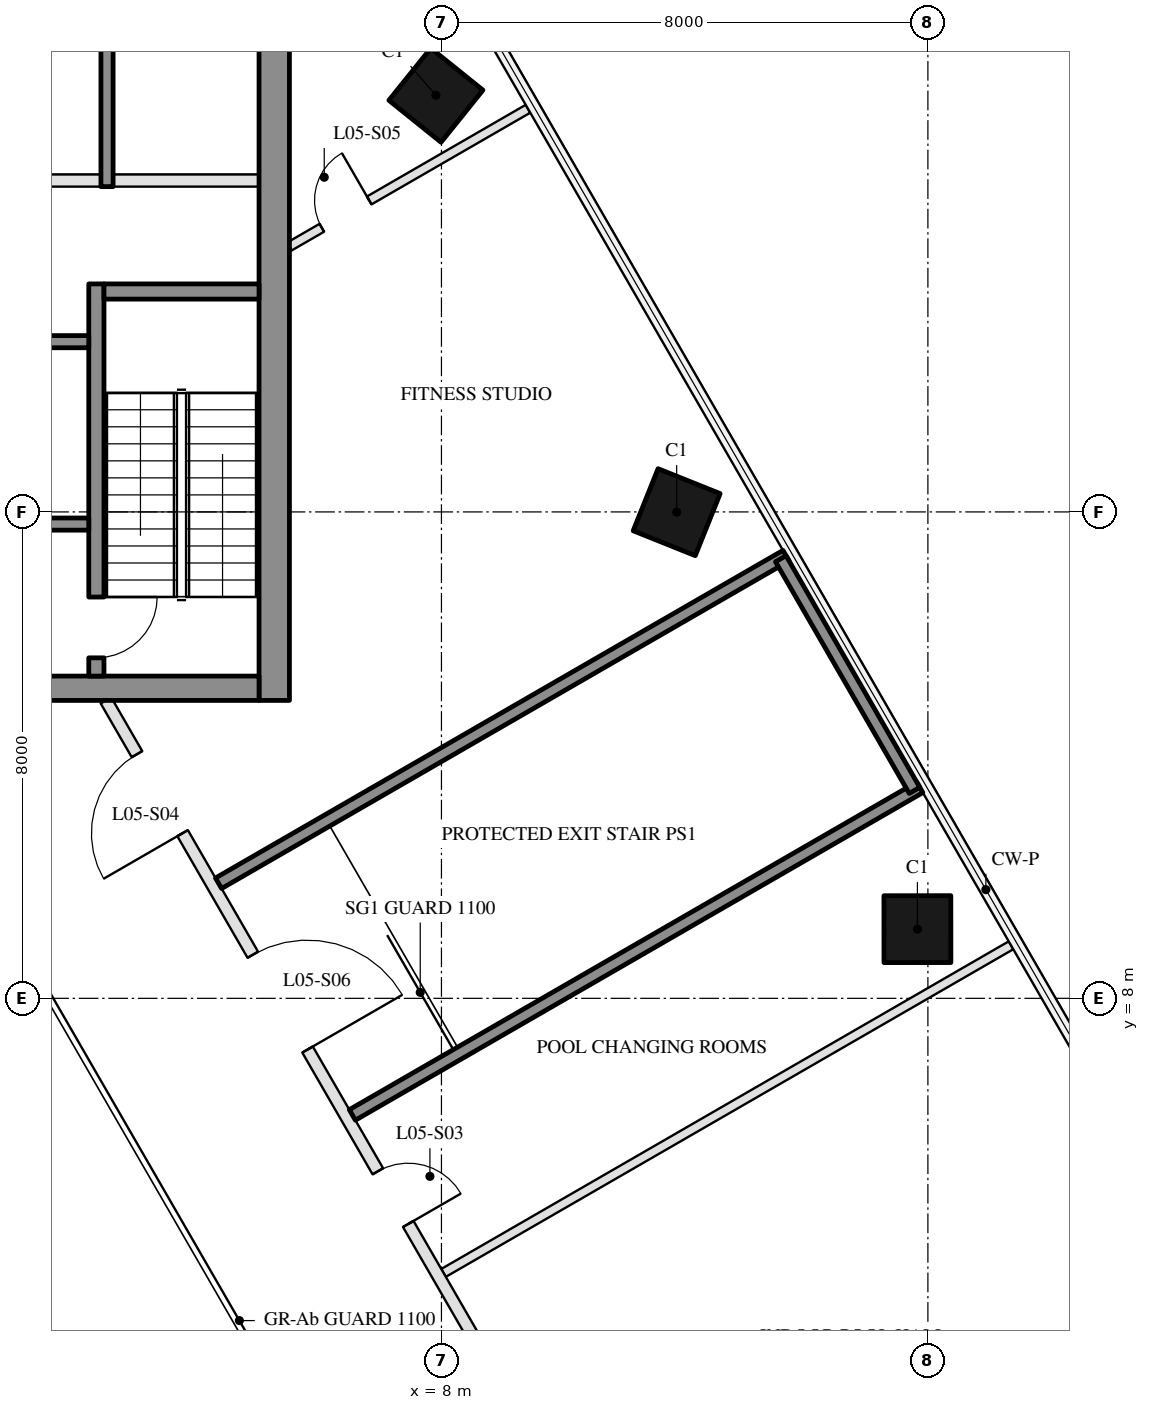
"""IFC4 building model, lengths in metres.
Left out: names, types, materials, properties, quantities, classifications, styles, units other than length and angle.
Written with IfcOpenShell. Run it as: python <this file> out.ifc"""

import sys

from ifc_helpers import new_model, si_unit, direction, frame, frame_2d, origin, origin_2d, place, context, subcontext, project, spatial, rectangle, hollow_rectangle, extrude, boolean, halfspace, element, fill, save


model = new_model("IFC4")
c1 = context("Model", 3, precision=1e-05, world=origin(), true_north=direction((0.0, 1.0)))
c2 = subcontext(c1, "Body", "Model", "MODEL_VIEW")
j1 = project(units=[si_unit("LENGTHUNIT", "METRE"), si_unit("PLANEANGLEUNIT", "RADIAN")], contexts=[c1])
p1 = place(None, origin())
s1 = spatial("IfcSite", under=j1, at=p1, CompositionType="ELEMENT")
p2 = place(p1, origin())
s2 = spatial("IfcBuilding", under=s1, at=p2, CompositionType="ELEMENT")
p3 = place(p2, frame((0.0, 0.0, 33.0)))
s3 = spatial("IfcBuildingStorey", under=s2, at=p3, CompositionType="ELEMENT", Elevation=33.0)
p4 = place(p3, frame((15.827, 9.138, 0.0), z_axis=(-0.008842855216, -0.005099560677, 0.999947897839), x_axis=(0.500158591732, -0.865933821414, 6.948309e-06)))
e1 = element("IfcColumn", 1, at=p4, inside=s3, PredefinedType="COLUMN", context=c2, shape_type="SweptSolid", body=[
    boolean("DIFFERENCE", boolean("DIFFERENCE", extrude(hollow_rectangle(XDim=1.1, YDim=1.1, WallThickness=0.05, at=origin_2d()), origin(), (0.0, 0.0, 1.0), 4.5), halfspace(frame((0.0, 0.0, 0.01), z_axis=(0.0, 0.0, 1.0), x_axis=(1.0, 0.0, 0.0)), True)), halfspace(frame((0.0, 0.0, 4.494), z_axis=(0.0, 0.0, 1.0), x_axis=(1.0, 0.0, 0.0)), False)),
])
p5 = place(p3, frame((11.868, 15.996, 0.0), z_axis=(-0.006835520265, -0.008680025734, 0.999938964545), x_axis=(-0.498767584387, 0.866726006756, 0.004114119219)))
e2 = element("IfcColumn", 2, at=p5, inside=s3, PredefinedType="COLUMN", context=c2, shape_type="SweptSolid", body=[
    boolean("DIFFERENCE", boolean("DIFFERENCE", extrude(hollow_rectangle(XDim=1.1, YDim=1.1, WallThickness=0.05, at=origin_2d()), origin(), (0.0, 0.0, 1.0), 4.5), halfspace(frame((0.0, 0.0, 0.01), z_axis=(0.0, 0.0, 1.0), x_axis=(1.0, 0.0, 0.0)), True)), halfspace(frame((0.0, 0.0, 4.494), z_axis=(0.0, 0.0, 1.0), x_axis=(1.0, 0.0, 0.0)), False)),
])
p6 = place(p3, frame((7.909, 22.854, 0.0), z_axis=(-0.004719641607, -0.012314467182, 0.999913035659), x_axis=(-0.503343741395, 0.864046735596, 0.008265391899)))
e3 = element("IfcColumn", 3, at=p6, inside=s3, PredefinedType="COLUMN", context=c2, shape_type="SweptSolid", body=[
    boolean("DIFFERENCE", boolean("DIFFERENCE", extrude(hollow_rectangle(XDim=1.1, YDim=1.1, WallThickness=0.05, at=origin_2d()), origin(), (0.0, 0.0, 1.0), 4.5), halfspace(frame((0.0, 0.0, 0.012), z_axis=(0.0, 0.0, 1.0), x_axis=(1.0, 0.0, 0.0)), True)), halfspace(frame((0.0, 0.0, 4.493), z_axis=(0.0, 0.0, 1.0), x_axis=(1.0, 0.0, 0.0)), False)),
])
p7 = place(p3, frame((5.25, 12.9, 0.0), z_axis=(0.0, 0.0, 1.0), x_axis=(0.0, 1.0, 0.0)))
e4 = element("IfcWall", 4, at=p7, inside=s3, PredefinedType="SHEAR", context=c2, shape_type="SweptSolid", body=[
    extrude(rectangle(XDim=14.91, YDim=0.5, at=frame_2d((7.455, 0.0))), origin(), (0.0, 0.0, 1.0), 4.2),
])
p8 = place(p3, frame((5.0, 13.1, 0.0), z_axis=(0.0, 0.0, 1.0), x_axis=(-1.0, 0.0, 0.0)))
e5 = element("IfcWall", 5, at=p8, inside=s3, PredefinedType="SHEAR", context=c2, shape_type="SweptSolid", body=[
    extrude(rectangle(XDim=10.0, YDim=0.4, at=frame_2d((5.0, 0.0))), origin(), (0.0, 0.0, 1.0), 4.2),
])
p9 = place(p8, frame((3.55, 0.0, 0.0)))
e6 = element("IfcOpeningElement", 6, at=p9, cuts=e5, PredefinedType="OPENING", context=c2, shape_type="SweptSolid", body=[
    extrude(rectangle(XDim=1.1, YDim=2.1, at=frame_2d((0.55, 1.05))), frame((0.0, 0.21, 0.0), z_axis=(0.0, -1.0, 0.0), x_axis=(1.0, 0.0, 0.0)), (0.0, 0.0, 1.0), 0.42),
])
p10 = place(p8, frame((5.85, 0.0, 0.0)))
e7 = element("IfcOpeningElement", 7, at=p10, cuts=e5, PredefinedType="OPENING", context=c2, shape_type="SweptSolid", body=[
    extrude(rectangle(XDim=1.4, YDim=2.1, at=frame_2d((0.7, 1.05))), frame((0.0, 0.21, 0.0), z_axis=(0.0, -1.0, 0.0), x_axis=(1.0, 0.0, 0.0)), (0.0, 0.0, 1.0), 0.42),
])
p11 = place(p3, frame((2.325, 13.3, 0.0), z_axis=(0.0, 0.0, 1.0), x_axis=(0.0, 1.0, 0.0)))
e8 = element("IfcWall", 8, at=p11, inside=s3, PredefinedType="SHEAR", context=c2, shape_type="SweptSolid", body=[
    extrude(rectangle(XDim=6.45, YDim=0.25, at=frame_2d((3.225, 0.0))), origin(), (0.0, 0.0, 1.0), 4.2),
])
p12 = place(p11, frame((0.3, 0.0, 0.0)))
e9 = element("IfcOpeningElement", 9, at=p12, cuts=e8, PredefinedType="OPENING", context=c2, shape_type="SweptSolid", body=[
    extrude(rectangle(XDim=1.0, YDim=2.1, at=frame_2d((0.5, 1.05))), frame((0.0, 0.135, 0.0), z_axis=(0.0, -1.0, 0.0), x_axis=(1.0, 0.0, 0.0)), (0.0, 0.0, 1.0), 0.27),
])
p13 = place(p3, frame((5.0, 19.625, 0.0), z_axis=(0.0, 0.0, 1.0), x_axis=(-1.0, 0.0, 0.0)))
e10 = element("IfcWall", 10, at=p13, inside=s3, PredefinedType="SHEAR", context=c2, shape_type="SweptSolid", body=[
    extrude(rectangle(XDim=2.55, YDim=0.25, at=frame_2d((1.275, 0.0))), origin(), (0.0, 0.0, 1.0), 4.2),
])
p14 = place(p3, frame((2.2, 18.8, 0.0), z_axis=(0.0, 0.0, 1.0), x_axis=(-1.0, 0.0, 0.0)))
e11 = element("IfcWall", 11, at=p14, inside=s3, PredefinedType="SHEAR", context=c2, shape_type="SweptSolid", body=[
    extrude(rectangle(XDim=2.8, YDim=0.2, at=frame_2d((1.4, 0.0))), origin(), (0.0, 0.0, 1.0), 4.2),
])
p15 = place(p3, frame((2.2, 15.8, 0.0), z_axis=(0.0, 0.0, 1.0), x_axis=(-1.0, 0.0, 0.0)))
e12 = element("IfcWall", 12, at=p15, inside=s3, PredefinedType="SHEAR", context=c2, shape_type="SweptSolid", body=[
    extrude(rectangle(XDim=2.8, YDim=0.2, at=frame_2d((1.4, 0.0))), origin(), (0.0, 0.0, 1.0), 4.2),
])
p16 = place(p15, frame((0.7, 0.0, 0.0)))
e13 = element("IfcOpeningElement", 13, at=p16, cuts=e12, PredefinedType="OPENING", context=c2, shape_type="SweptSolid", body=[
    extrude(rectangle(XDim=1.2, YDim=2.1, at=frame_2d((0.6, 1.05))), frame((0.0, 0.11, 0.0), z_axis=(0.0, -1.0, 0.0), x_axis=(1.0, 0.0, 0.0)), (0.0, 0.0, 1.0), 0.22),
])
p17 = place(p3, frame((2.5, 21.35, 0.0), z_axis=(0.0, 0.0, 1.0), x_axis=(0.0, 1.0, 0.0)))
e14 = element("IfcWall", 14, at=p17, inside=s3, PredefinedType="SHEAR", context=c2, shape_type="SweptSolid", body=[
    extrude(rectangle(XDim=2.8, YDim=0.2, at=frame_2d((1.4, 0.0))), origin(), (0.0, 0.0, 1.0), 4.2),
])
p18 = place(p3, frame((5.0, 21.45, 0.0), z_axis=(0.0, 0.0, 1.0), x_axis=(-1.0, 0.0, 0.0)))
e15 = element("IfcWall", 15, at=p18, inside=s3, PredefinedType="PARTITIONING", context=c2, shape_type="SweptSolid", body=[
    extrude(rectangle(XDim=2.4, YDim=0.2, at=frame_2d((1.2, 0.0))), origin(), (0.0, 0.0, 1.0), 4.2),
])
p19 = place(p3, frame((2.4, 21.45, 0.0), z_axis=(0.0, 0.0, 1.0), x_axis=(-1.0, 0.0, 0.0)))
e16 = element("IfcWall", 16, at=p19, inside=s3, PredefinedType="PARTITIONING", context=c2, shape_type="SweptSolid", body=[
    extrude(rectangle(XDim=2.8, YDim=0.2, at=frame_2d((1.4, 0.0))), origin(), (0.0, 0.0, 1.0), 4.2),
])
p20 = place(p3, frame((17.367, 8.872, 0.0), z_axis=(0.0, 0.0, 1.0), x_axis=(-0.866017693218, -0.500013354855, 0.0)))
e17 = element("IfcWall", 17, at=p20, inside=s3, PredefinedType="PARTITIONING", context=c2, shape_type="SweptSolid", body=[
    extrude(rectangle(XDim=10.776, YDim=0.15, at=frame_2d((5.388, 0.0))), origin(), (0.0, 0.0, 1.0), 4.2),
])
p21 = place(p3, frame((15.867, 11.47, 0.0), z_axis=(0.0, 0.0, 1.0), x_axis=(-0.866017693218, -0.500013354855, 0.0)))
e18 = element("IfcWall", 18, at=p21, inside=s3, PredefinedType="SOLIDWALL", context=c2, shape_type="SweptSolid", body=[
    extrude(rectangle(XDim=10.776, YDim=0.2, at=frame_2d((5.388, 0.0))), origin(), (0.0, 0.0, 1.0), 4.2),
])
p22 = place(p3, frame((13.667, 15.281, 0.0), z_axis=(0.0, 0.0, 1.0), x_axis=(-0.866027503583, -0.499996363024, 0.0)))
e19 = element("IfcWall", 19, at=p22, inside=s3, PredefinedType="SOLIDWALL", context=c2, shape_type="SweptSolid", body=[
    extrude(rectangle(XDim=10.776, YDim=0.2, at=frame_2d((5.388, 0.0))), origin(), (0.0, 0.0, 1.0), 4.2),
])
p23 = place(p3, frame((9.423, 22.631, 0.0), z_axis=(0.0, 0.0, 1.0), x_axis=(-0.866012369481, -0.500022575396, 0.0)))
e20 = element("IfcWall", 20, at=p23, inside=s3, PredefinedType="PARTITIONING", context=c2, shape_type="SweptSolid", body=[
    extrude(rectangle(XDim=4.53, YDim=0.15, at=frame_2d((2.265, 0.0))), origin(), (0.0, 0.0, 1.0), 4.2),
])
p24 = place(p23, frame((3.015, 0.0, 0.0)))
e21 = element("IfcOpeningElement", 21, at=p24, cuts=e20, PredefinedType="OPENING", context=c2, shape_type="SweptSolid", body=[
    extrude(rectangle(XDim=0.9, YDim=2.1, at=frame_2d((0.45, 1.05))), frame((0.0, 0.085, 0.0), z_axis=(0.0, -1.0, 0.0), x_axis=(1.0, 0.0, 0.0)), (0.0, 0.0, 1.0), 0.17),
])
p25 = place(p3, frame((12.413, -4.3, 0.0), z_axis=(0.0, 0.0, 1.0), x_axis=(-0.50000478328, 0.866022642139, 0.0)))
e22 = element("IfcWall", 22, at=p25, inside=s3, PredefinedType="PARTITIONING", context=c2, shape_type="SweptSolid", body=[
    extrude(rectangle(XDim=19.861, YDim=0.2, at=frame_2d((9.931, 0.0))), origin(), (0.0, 0.0, 1.0), 3.41),
])
p26 = place(p25, frame((1.642, 0.0, 0.0)))
e23 = element("IfcOpeningElement", 23, at=p26, cuts=e22, PredefinedType="OPENING", context=c2, shape_type="SweptSolid", body=[
    extrude(rectangle(XDim=1.2, YDim=2.1, at=frame_2d((0.6, 1.05))), frame((0.0, 0.11, 0.0), z_axis=(0.0, -1.0, 0.0), x_axis=(1.0, 0.0, 0.0)), (0.0, 0.0, 1.0), 0.22),
])
p27 = place(p25, frame((6.125, 0.0, 0.0)))
e24 = element("IfcOpeningElement", 24, at=p27, cuts=e22, PredefinedType="OPENING", context=c2, shape_type="SweptSolid", body=[
    extrude(rectangle(XDim=1.2, YDim=2.1, at=frame_2d((0.6, 1.05))), frame((0.0, 0.11, 0.0), z_axis=(0.0, -1.0, 0.0), x_axis=(1.0, 0.0, 0.0)), (0.0, 0.0, 1.0), 0.22),
])
p28 = place(p25, frame((9.918, 0.0, 0.0)))
e25 = element("IfcOpeningElement", 25, at=p28, cuts=e22, PredefinedType="OPENING", context=c2, shape_type="SweptSolid", body=[
    extrude(rectangle(XDim=1.0, YDim=2.1, at=frame_2d((0.5, 1.05))), frame((0.0, 0.11, 0.0), z_axis=(0.0, -1.0, 0.0), x_axis=(1.0, 0.0, 0.0)), (0.0, 0.0, 1.0), 0.22),
])
p29 = place(p25, frame((17.34, 0.0, 0.0)))
e26 = element("IfcOpeningElement", 26, at=p29, cuts=e22, PredefinedType="OPENING", context=c2, shape_type="SweptSolid", body=[
    extrude(rectangle(XDim=1.5, YDim=2.1, at=frame_2d((0.75, 1.05))), frame((0.0, 0.11, 0.0), z_axis=(0.0, -1.0, 0.0), x_axis=(1.0, 0.0, 0.0)), (0.0, 0.0, 1.0), 0.22),
])
p30 = place(p25, frame((13.23, 0.0, 0.0)))
e27 = element("IfcOpeningElement", 27, at=p30, cuts=e22, PredefinedType="OPENING", context=c2, shape_type="SweptSolid", body=[
    extrude(rectangle(XDim=1.8, YDim=2.1, at=frame_2d((0.9, 1.05))), frame((0.0, 0.11, 0.0), z_axis=(0.0, -1.0, 0.0), x_axis=(1.0, 0.0, 0.0)), (0.0, 0.0, 1.0), 0.22),
])
p31 = place(p3, frame((15.78, 11.42, 0.0), z_axis=(0.0, 0.0, 1.0), x_axis=(-0.50002983664, 0.866008176907, 0.0)))
e28 = element("IfcWall", 28, at=p31, inside=s3, PredefinedType="SOLIDWALL", context=c2, shape_type="SweptSolid", body=[
    extrude(rectangle(XDim=4.4, YDim=0.2, at=frame_2d((2.2, 0.0))), origin(), (0.0, 0.0, 1.0), 4.2),
])
p32 = place(p12, frame((1.0, 0.0, 0.0), z_axis=(0.0, 0.0, 1.0), x_axis=(-1.0, 0.0, 0.0)))
e29 = element("IfcDoor", 29, at=p32, inside=s3, OperationType="SINGLE_SWING_LEFT", PredefinedType="DOOR", context=c2, shape_type="SweptSolid", body=[
    extrude(rectangle(XDim=1.0, YDim=2.1, at=frame_2d((0.5, 1.05))), frame((0.0, 0.025, 0.0), z_axis=(0.0, -1.0, 0.0), x_axis=(1.0, 0.0, 0.0)), (0.0, 0.0, 1.0), 0.05),
])
fill(e9, e29)
p33 = place(p28, frame((1.0, 0.0, 0.0), z_axis=(0.0, 0.0, 1.0), x_axis=(-1.0, 0.0, 0.0)))
e30 = element("IfcDoor", 30, at=p33, inside=s3, OperationType="SINGLE_SWING_RIGHT", PredefinedType="DOOR", context=c2, shape_type="SweptSolid", body=[
    extrude(rectangle(XDim=1.0, YDim=2.1, at=frame_2d((0.5, 1.05))), frame((0.0, 0.025, 0.0), z_axis=(0.0, -1.0, 0.0), x_axis=(1.0, 0.0, 0.0)), (0.0, 0.0, 1.0), 0.05),
])
fill(e25, e30)
p34 = place(p29, origin())
e31 = element("IfcDoor", 31, at=p34, inside=s3, OperationType="DOUBLE_DOOR_SINGLE_SWING", PredefinedType="DOOR", context=c2, shape_type="SweptSolid", body=[
    extrude(rectangle(XDim=1.5, YDim=2.1, at=frame_2d((0.75, 1.05))), frame((0.0, 0.025, 0.0), z_axis=(0.0, -1.0, 0.0), x_axis=(1.0, 0.0, 0.0)), (0.0, 0.0, 1.0), 0.05),
])
fill(e26, e31)
p35 = place(p24, frame((0.9, 0.0, 0.0), z_axis=(0.0, 0.0, 1.0), x_axis=(-1.0, 0.0, 0.0)))
e32 = element("IfcDoor", 32, at=p35, inside=s3, OperationType="SINGLE_SWING_RIGHT", PredefinedType="DOOR", context=c2, shape_type="SweptSolid", body=[
    extrude(rectangle(XDim=0.9, YDim=2.1, at=frame_2d((0.45, 1.05))), frame((0.0, 0.025, 0.0), z_axis=(0.0, -1.0, 0.0), x_axis=(1.0, 0.0, 0.0)), (0.0, 0.0, 1.0), 0.05),
])
fill(e21, e32)
p36 = place(p30, frame((1.8, 0.0, 0.0), z_axis=(0.0, 0.0, 1.0), x_axis=(-1.0, 0.0, 0.0)))
e33 = element("IfcDoor", 33, at=p36, inside=s3, OperationType="DOUBLE_DOOR_SINGLE_SWING", PredefinedType="DOOR", context=c2, shape_type="SweptSolid", body=[
    extrude(rectangle(XDim=1.8, YDim=2.1, at=frame_2d((0.9, 1.05))), frame((0.0, 0.025, 0.0), z_axis=(0.0, -1.0, 0.0), x_axis=(1.0, 0.0, 0.0)), (0.0, 0.0, 1.0), 0.05),
])
fill(e27, e33)
save(model, sys.argv[1])
